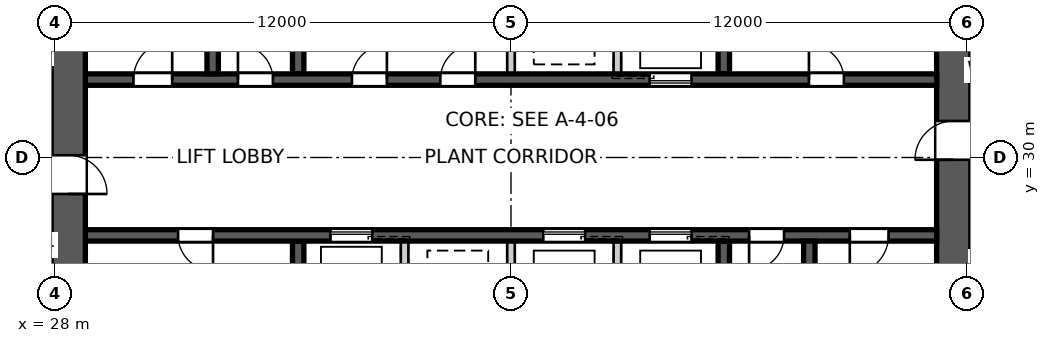
"""IFC4 building model, lengths in metres.
Left out: names, types, materials, properties, quantities, classifications, styles, units other than length and angle.
Written with IfcOpenShell. Run it as: python <this file> out.ifc"""

import sys

from ifc_helpers import new_model, si_unit, direction, frame, frame_2d, origin, place, context, subcontext, project, spatial, polyline, rectangle, outline, extrude, element, fill, save


model = new_model("IFC4")
c1 = context("Model", 3, precision=1e-05, world=origin(), true_north=direction((0.0, 1.0)))
c2 = subcontext(c1, "Body", "Model", "MODEL_VIEW")
j1 = project(units=[si_unit("LENGTHUNIT", "METRE"), si_unit("PLANEANGLEUNIT", "RADIAN")], contexts=[c1])
p1 = place(None, origin())
s1 = spatial("IfcSite", under=j1, at=p1, CompositionType="ELEMENT")
p2 = place(p1, origin())
s2 = spatial("IfcBuilding", under=s1, at=p2, CompositionType="ELEMENT")
p3 = place(p2, frame((0.0, 0.0, 203.2)))
s3 = spatial("IfcBuildingStorey", under=s2, at=p3, CompositionType="ELEMENT", Elevation=203.2)
p4 = place(p3, frame((51.65, 18.8, 0.0), z_axis=(0.0, 0.0, 1.0), x_axis=(0.0, 1.0, 0.0)))
e1 = element("IfcWall", 1, at=p4, inside=s3, PredefinedType="SHEAR", context=c2, shape_type="SweptSolid", body=[
    extrude(outline(polyline([(0.0, -0.45), (22.4, -0.45), (22.4, -0.025), (22.85, -0.025), (22.85, 0.025), (22.4, 0.025), (22.4, 0.45), (0.0, 0.45), (0.0, 0.025), (-0.45, 0.025), (-0.45, -0.025), (0.0, -0.025), (0.0, -0.45)])), origin(), (0.0, 0.0, 1.0), 5.0),
])
p5 = place(p4, frame((11.14, 0.0, 0.0)))
e2 = element("IfcOpeningElement", 2, at=p5, cuts=e1, PredefinedType="OPENING", context=c2, shape_type="SweptSolid", body=[
    extrude(rectangle(XDim=1.02, YDim=2.4, at=frame_2d((0.51, 1.2))), frame((0.0, 0.46, 0.0), z_axis=(0.0, -1.0, 0.0), x_axis=(1.0, 0.0, 0.0)), (0.0, 0.0, 1.0), 0.92),
])
p6 = place(p3, frame((28.35, 41.2, 0.0), z_axis=(0.0, 0.0, 1.0), x_axis=(0.0, -1.0, 0.0)))
e3 = element("IfcWall", 3, at=p6, inside=s3, PredefinedType="SHEAR", context=c2, shape_type="SweptSolid", body=[
    extrude(outline(polyline([(0.0, -0.45), (22.4, -0.45), (22.4, -0.025), (22.85, -0.025), (22.85, 0.025), (22.4, 0.025), (22.4, 0.45), (0.0, 0.45), (0.0, 0.025), (-0.45, 0.025), (-0.45, -0.025), (0.0, -0.025), (0.0, -0.45)])), origin(), (0.0, 0.0, 1.0), 5.0),
])
p7 = place(p6, frame((11.14, 0.0, 0.0)))
e4 = element("IfcOpeningElement", 4, at=p7, cuts=e3, PredefinedType="OPENING", context=c2, shape_type="SweptSolid", body=[
    extrude(rectangle(XDim=1.02, YDim=2.4, at=frame_2d((0.51, 1.2))), frame((0.0, 0.46, 0.0), z_axis=(0.0, -1.0, 0.0), x_axis=(1.0, 0.0, 0.0)), (0.0, 0.0, 1.0), 0.92),
])
p8 = place(p3, frame((28.8, 32.05, 0.0), z_axis=(0.0, 0.0, 1.0), x_axis=(1.0, 0.0, 0.0)))
e5 = element("IfcWall", 5, at=p8, inside=s3, PredefinedType="SHEAR", context=c2, shape_type="SweptSolid", body=[
    extrude(rectangle(XDim=22.4, YDim=0.3, at=frame_2d((11.2, 0.0))), origin(), (0.0, 0.0, 1.0), 5.0),
])
p9 = place(p8, frame((19.04, 0.0, 0.0)))
e6 = element("IfcOpeningElement", 6, at=p9, cuts=e5, PredefinedType="OPENING", context=c2, shape_type="SweptSolid", body=[
    extrude(rectangle(XDim=0.92, YDim=2.1, at=frame_2d((0.46, 1.05))), frame((0.0, 0.16, 0.0), z_axis=(0.0, -1.0, 0.0), x_axis=(1.0, 0.0, 0.0)), (0.0, 0.0, 1.0), 0.32),
])
p10 = place(p8, frame((1.265, 0.0, 0.0)))
e7 = element("IfcOpeningElement", 7, at=p10, cuts=e5, PredefinedType="OPENING", context=c2, shape_type="SweptSolid", body=[
    extrude(rectangle(XDim=1.02, YDim=2.1, at=frame_2d((0.51, 1.05))), frame((0.0, 0.16, 0.0), z_axis=(0.0, -1.0, 0.0), x_axis=(1.0, 0.0, 0.0)), (0.0, 0.0, 1.0), 0.32),
])
p11 = place(p8, frame((4.015, 0.0, 0.0)))
e8 = element("IfcOpeningElement", 8, at=p11, cuts=e5, PredefinedType="OPENING", context=c2, shape_type="SweptSolid", body=[
    extrude(rectangle(XDim=0.92, YDim=2.1, at=frame_2d((0.46, 1.05))), frame((0.0, 0.16, 0.0), z_axis=(0.0, -1.0, 0.0), x_axis=(1.0, 0.0, 0.0)), (0.0, 0.0, 1.0), 0.32),
])
p12 = place(p8, frame((7.015, 0.0, 0.0)))
e9 = element("IfcOpeningElement", 9, at=p12, cuts=e5, PredefinedType="OPENING", context=c2, shape_type="SweptSolid", body=[
    extrude(rectangle(XDim=0.92, YDim=2.1, at=frame_2d((0.46, 1.05))), frame((0.0, 0.16, 0.0), z_axis=(0.0, -1.0, 0.0), x_axis=(1.0, 0.0, 0.0)), (0.0, 0.0, 1.0), 0.32),
])
p13 = place(p8, frame((9.34, 0.0, 0.0)))
e10 = element("IfcOpeningElement", 10, at=p13, cuts=e5, PredefinedType="OPENING", context=c2, shape_type="SweptSolid", body=[
    extrude(rectangle(XDim=0.92, YDim=2.1, at=frame_2d((0.46, 1.05))), frame((0.0, 0.16, 0.0), z_axis=(0.0, -1.0, 0.0), x_axis=(1.0, 0.0, 0.0)), (0.0, 0.0, 1.0), 0.32),
])
p14 = place(p8, frame((14.85, 0.0, 0.0)))
e11 = element("IfcOpeningElement", 11, at=p14, cuts=e5, PredefinedType="OPENING", context=c2, shape_type="SweptSolid", body=[
    extrude(rectangle(XDim=1.1, YDim=2.1, at=frame_2d((0.55, 1.05))), frame((0.0, 0.16, 0.0), z_axis=(0.0, -1.0, 0.0), x_axis=(1.0, 0.0, 0.0)), (0.0, 0.0, 1.0), 0.32),
])
p15 = place(p3, frame((51.2, 27.95, 0.0), z_axis=(0.0, 0.0, 1.0), x_axis=(-1.0, 0.0, 0.0)))
e12 = element("IfcWall", 12, at=p15, inside=s3, PredefinedType="SHEAR", context=c2, shape_type="SweptSolid", body=[
    extrude(rectangle(XDim=22.4, YDim=0.3, at=frame_2d((11.2, 0.0))), origin(), (0.0, 0.0, 1.0), 5.0),
])
p16 = place(p15, frame((19.04, 0.0, 0.0)))
e13 = element("IfcOpeningElement", 13, at=p16, cuts=e12, PredefinedType="OPENING", context=c2, shape_type="SweptSolid", body=[
    extrude(rectangle(XDim=0.92, YDim=2.1, at=frame_2d((0.46, 1.05))), frame((0.0, 0.16, 0.0), z_axis=(0.0, -1.0, 0.0), x_axis=(1.0, 0.0, 0.0)), (0.0, 0.0, 1.0), 0.32),
])
p17 = place(p15, frame((1.265, 0.0, 0.0)))
e14 = element("IfcOpeningElement", 14, at=p17, cuts=e12, PredefinedType="OPENING", context=c2, shape_type="SweptSolid", body=[
    extrude(rectangle(XDim=1.02, YDim=2.1, at=frame_2d((0.51, 1.05))), frame((0.0, 0.16, 0.0), z_axis=(0.0, -1.0, 0.0), x_axis=(1.0, 0.0, 0.0)), (0.0, 0.0, 1.0), 0.32),
])
p18 = place(p15, frame((4.015, 0.0, 0.0)))
e15 = element("IfcOpeningElement", 15, at=p18, cuts=e12, PredefinedType="OPENING", context=c2, shape_type="SweptSolid", body=[
    extrude(rectangle(XDim=0.92, YDim=2.1, at=frame_2d((0.46, 1.05))), frame((0.0, 0.16, 0.0), z_axis=(0.0, -1.0, 0.0), x_axis=(1.0, 0.0, 0.0)), (0.0, 0.0, 1.0), 0.32),
])
p19 = place(p15, frame((6.45, 0.0, 0.0)))
e16 = element("IfcOpeningElement", 16, at=p19, cuts=e12, PredefinedType="OPENING", context=c2, shape_type="SweptSolid", body=[
    extrude(rectangle(XDim=1.1, YDim=2.1, at=frame_2d((0.55, 1.05))), frame((0.0, 0.16, 0.0), z_axis=(0.0, -1.0, 0.0), x_axis=(1.0, 0.0, 0.0)), (0.0, 0.0, 1.0), 0.32),
])
p20 = place(p15, frame((9.25, 0.0, 0.0)))
e17 = element("IfcOpeningElement", 17, at=p20, cuts=e12, PredefinedType="OPENING", context=c2, shape_type="SweptSolid", body=[
    extrude(rectangle(XDim=1.1, YDim=2.1, at=frame_2d((0.55, 1.05))), frame((0.0, 0.16, 0.0), z_axis=(0.0, -1.0, 0.0), x_axis=(1.0, 0.0, 0.0)), (0.0, 0.0, 1.0), 0.32),
])
p21 = place(p15, frame((14.85, 0.0, 0.0)))
e18 = element("IfcOpeningElement", 18, at=p21, cuts=e12, PredefinedType="OPENING", context=c2, shape_type="SweptSolid", body=[
    extrude(rectangle(XDim=1.1, YDim=2.1, at=frame_2d((0.55, 1.05))), frame((0.0, 0.16, 0.0), z_axis=(0.0, -1.0, 0.0), x_axis=(1.0, 0.0, 0.0)), (0.0, 0.0, 1.0), 0.32),
])
for number, where, z_axis, x_axis in (
    (19, (34.4, 32.2, 0.0), (0.0, 0.0, 1.0), (0.0, 1.0, 0.0)),
    (20, (45.6, 27.8, 0.0), (0.0, 0.0, 1.0), (0.0, -1.0, 0.0)),
):
    element("IfcWall", number, at=place(p3, frame(where, z_axis=z_axis, x_axis=x_axis)), inside=s3, PredefinedType="SHEAR", context=c2, shape_type="SweptSolid", body=[
        extrude(rectangle(XDim=2.8, YDim=0.3, at=frame_2d((1.4, 0.0))), origin(), (0.0, 0.0, 1.0), 5.0),
    ])
for number, where, z_axis, x_axis in (
    (21, (42.8, 27.8, 0.0), (0.0, 0.0, 1.0), (0.0, -1.0, 0.0)),
    (22, (40.0, 32.2, 0.0), (0.0, 0.0, 1.0), (0.0, 1.0, 0.0)),
    (23, (40.0, 27.8, 0.0), (0.0, 0.0, 1.0), (0.0, -1.0, 0.0)),
    (24, (42.8, 32.2, 0.0), (0.0, 0.0, 1.0), (0.0, 1.0, 0.0)),
    (25, (37.2, 27.8, 0.0), (0.0, 0.0, 1.0), (0.0, -1.0, 0.0)),
):
    element("IfcWall", number, at=place(p3, frame(where, z_axis=z_axis, x_axis=x_axis)), inside=s3, PredefinedType="SOLIDWALL", context=c2, shape_type="SweptSolid", body=[
        extrude(rectangle(XDim=2.8, YDim=0.2, at=frame_2d((1.4, 0.0))), origin(), (0.0, 0.0, 1.0), 5.0),
    ])
for number, where, z_axis, x_axis in (
    (26, (45.6, 32.2, 0.0), (0.0, 0.0, 1.0), (0.0, 1.0, 0.0)),
    (27, (34.4, 27.8, 0.0), (0.0, 0.0, 1.0), (0.0, -1.0, 0.0)),
):
    element("IfcWall", number, at=place(p3, frame(where, z_axis=z_axis, x_axis=x_axis)), inside=s3, PredefinedType="SHEAR", context=c2, shape_type="SweptSolid", body=[
        extrude(rectangle(XDim=2.8, YDim=0.3, at=frame_2d((1.4, 0.0))), origin(), (0.0, 0.0, 1.0), 5.0),
    ])
for number, where, z_axis, x_axis in (
    (28, (32.15, 32.2, 0.0), (0.0, 0.0, 1.0), (0.0, 1.0, 0.0)),
    (29, (47.85, 27.8, 0.0), (0.0, 0.0, 1.0), (0.0, -1.0, 0.0)),
):
    element("IfcWall", number, at=place(p3, frame(where, z_axis=z_axis, x_axis=x_axis)), inside=s3, PredefinedType="SHEAR", context=c2, shape_type="SweptSolid", body=[
        extrude(rectangle(XDim=7.7, YDim=0.3, at=frame_2d((3.85, 0.0))), origin(), (0.0, 0.0, 1.0), 5.0),
    ])
p22 = place(p9, origin())
e30 = element("IfcDoor", 30, at=p22, inside=s3, OperationType="SINGLE_SWING_LEFT", PredefinedType="DOOR", context=c2, shape_type="SweptSolid", body=[
    extrude(rectangle(XDim=0.92, YDim=2.1, at=frame_2d((0.46, 1.05))), frame((0.0, 0.025, 0.0), z_axis=(0.0, -1.0, 0.0), x_axis=(1.0, 0.0, 0.0)), (0.0, 0.0, 1.0), 0.05),
])
fill(e6, e30)
p23 = place(p16, origin())
e31 = element("IfcDoor", 31, at=p23, inside=s3, OperationType="SINGLE_SWING_LEFT", PredefinedType="DOOR", context=c2, shape_type="SweptSolid", body=[
    extrude(rectangle(XDim=0.92, YDim=2.1, at=frame_2d((0.46, 1.05))), frame((0.0, 0.025, 0.0), z_axis=(0.0, -1.0, 0.0), x_axis=(1.0, 0.0, 0.0)), (0.0, 0.0, 1.0), 0.05),
])
fill(e13, e31)
p24 = place(p17, origin())
e32 = element("IfcDoor", 32, at=p24, inside=s3, OperationType="SINGLE_SWING_RIGHT", PredefinedType="DOOR", context=c2, shape_type="SweptSolid", body=[
    extrude(rectangle(XDim=1.02, YDim=2.1, at=frame_2d((0.51, 1.05))), frame((0.0, 0.025, 0.0), z_axis=(0.0, -1.0, 0.0), x_axis=(1.0, 0.0, 0.0)), (0.0, 0.0, 1.0), 0.05),
])
fill(e14, e32)
p25 = place(p10, origin())
e33 = element("IfcDoor", 33, at=p25, inside=s3, OperationType="SINGLE_SWING_RIGHT", PredefinedType="DOOR", context=c2, shape_type="SweptSolid", body=[
    extrude(rectangle(XDim=1.02, YDim=2.1, at=frame_2d((0.51, 1.05))), frame((0.0, 0.025, 0.0), z_axis=(0.0, -1.0, 0.0), x_axis=(1.0, 0.0, 0.0)), (0.0, 0.0, 1.0), 0.05),
])
fill(e7, e33)
p26 = place(p11, origin())
e34 = element("IfcDoor", 34, at=p26, inside=s3, OperationType="SINGLE_SWING_LEFT", PredefinedType="DOOR", context=c2, shape_type="SweptSolid", body=[
    extrude(rectangle(XDim=0.92, YDim=2.1, at=frame_2d((0.46, 1.05))), frame((0.0, 0.025, 0.0), z_axis=(0.0, -1.0, 0.0), x_axis=(1.0, 0.0, 0.0)), (0.0, 0.0, 1.0), 0.05),
])
fill(e8, e34)
p27 = place(p18, origin())
e35 = element("IfcDoor", 35, at=p27, inside=s3, OperationType="SINGLE_SWING_RIGHT", PredefinedType="DOOR", context=c2, shape_type="SweptSolid", body=[
    extrude(rectangle(XDim=0.92, YDim=2.1, at=frame_2d((0.46, 1.05))), frame((0.0, 0.025, 0.0), z_axis=(0.0, -1.0, 0.0), x_axis=(1.0, 0.0, 0.0)), (0.0, 0.0, 1.0), 0.05),
])
fill(e15, e35)
p28 = place(p12, origin())
e36 = element("IfcDoor", 36, at=p28, inside=s3, OperationType="SINGLE_SWING_RIGHT", PredefinedType="DOOR", context=c2, shape_type="SweptSolid", body=[
    extrude(rectangle(XDim=0.92, YDim=2.1, at=frame_2d((0.46, 1.05))), frame((0.0, 0.025, 0.0), z_axis=(0.0, -1.0, 0.0), x_axis=(1.0, 0.0, 0.0)), (0.0, 0.0, 1.0), 0.05),
])
fill(e9, e36)
p29 = place(p13, origin())
e37 = element("IfcDoor", 37, at=p29, inside=s3, OperationType="SINGLE_SWING_RIGHT", PredefinedType="DOOR", context=c2, shape_type="SweptSolid", body=[
    extrude(rectangle(XDim=0.92, YDim=2.1, at=frame_2d((0.46, 1.05))), frame((0.0, 0.025, 0.0), z_axis=(0.0, -1.0, 0.0), x_axis=(1.0, 0.0, 0.0)), (0.0, 0.0, 1.0), 0.05),
])
fill(e10, e37)
p30 = place(p5, origin())
e38 = element("IfcDoor", 38, at=p30, inside=s3, OperationType="SINGLE_SWING_LEFT", PredefinedType="DOOR", context=c2, shape_type="SweptSolid", body=[
    extrude(rectangle(XDim=1.02, YDim=2.4, at=frame_2d((0.51, 1.2))), frame((0.0, 0.025, 0.0), z_axis=(0.0, -1.0, 0.0), x_axis=(1.0, 0.0, 0.0)), (0.0, 0.0, 1.0), 0.05),
])
fill(e2, e38)
p31 = place(p7, origin())
e39 = element("IfcDoor", 39, at=p31, inside=s3, OperationType="SINGLE_SWING_RIGHT", PredefinedType="DOOR", context=c2, shape_type="SweptSolid", body=[
    extrude(rectangle(XDim=1.02, YDim=2.4, at=frame_2d((0.51, 1.2))), frame((0.0, 0.025, 0.0), z_axis=(0.0, -1.0, 0.0), x_axis=(1.0, 0.0, 0.0)), (0.0, 0.0, 1.0), 0.05),
])
fill(e4, e39)
p32 = place(p19, origin())
e40 = element("IfcDoor", 40, at=p32, inside=s3, OperationType="SLIDING_TO_LEFT", PredefinedType="DOOR", context=c2, shape_type="SweptSolid", body=[
    extrude(rectangle(XDim=1.1, YDim=2.1, at=frame_2d((0.55, 1.05))), frame((0.0, 0.025, 0.0), z_axis=(0.0, -1.0, 0.0), x_axis=(1.0, 0.0, 0.0)), (0.0, 0.0, 1.0), 0.05),
])
fill(e16, e40)
p33 = place(p20, origin())
e41 = element("IfcDoor", 41, at=p33, inside=s3, OperationType="SLIDING_TO_LEFT", PredefinedType="DOOR", context=c2, shape_type="SweptSolid", body=[
    extrude(rectangle(XDim=1.1, YDim=2.1, at=frame_2d((0.55, 1.05))), frame((0.0, 0.025, 0.0), z_axis=(0.0, -1.0, 0.0), x_axis=(1.0, 0.0, 0.0)), (0.0, 0.0, 1.0), 0.05),
])
fill(e17, e41)
p34 = place(p14, origin())
e42 = element("IfcDoor", 42, at=p34, inside=s3, OperationType="SLIDING_TO_LEFT", PredefinedType="DOOR", context=c2, shape_type="SweptSolid", body=[
    extrude(rectangle(XDim=1.1, YDim=2.1, at=frame_2d((0.55, 1.05))), frame((0.0, 0.025, 0.0), z_axis=(0.0, -1.0, 0.0), x_axis=(1.0, 0.0, 0.0)), (0.0, 0.0, 1.0), 0.05),
])
fill(e11, e42)
p35 = place(p21, origin())
e43 = element("IfcDoor", 43, at=p35, inside=s3, OperationType="SLIDING_TO_LEFT", PredefinedType="DOOR", context=c2, shape_type="SweptSolid", body=[
    extrude(rectangle(XDim=1.1, YDim=2.1, at=frame_2d((0.55, 1.05))), frame((0.0, 0.025, 0.0), z_axis=(0.0, -1.0, 0.0), x_axis=(1.0, 0.0, 0.0)), (0.0, 0.0, 1.0), 0.05),
])
fill(e18, e43)
save(model, sys.argv[1])
